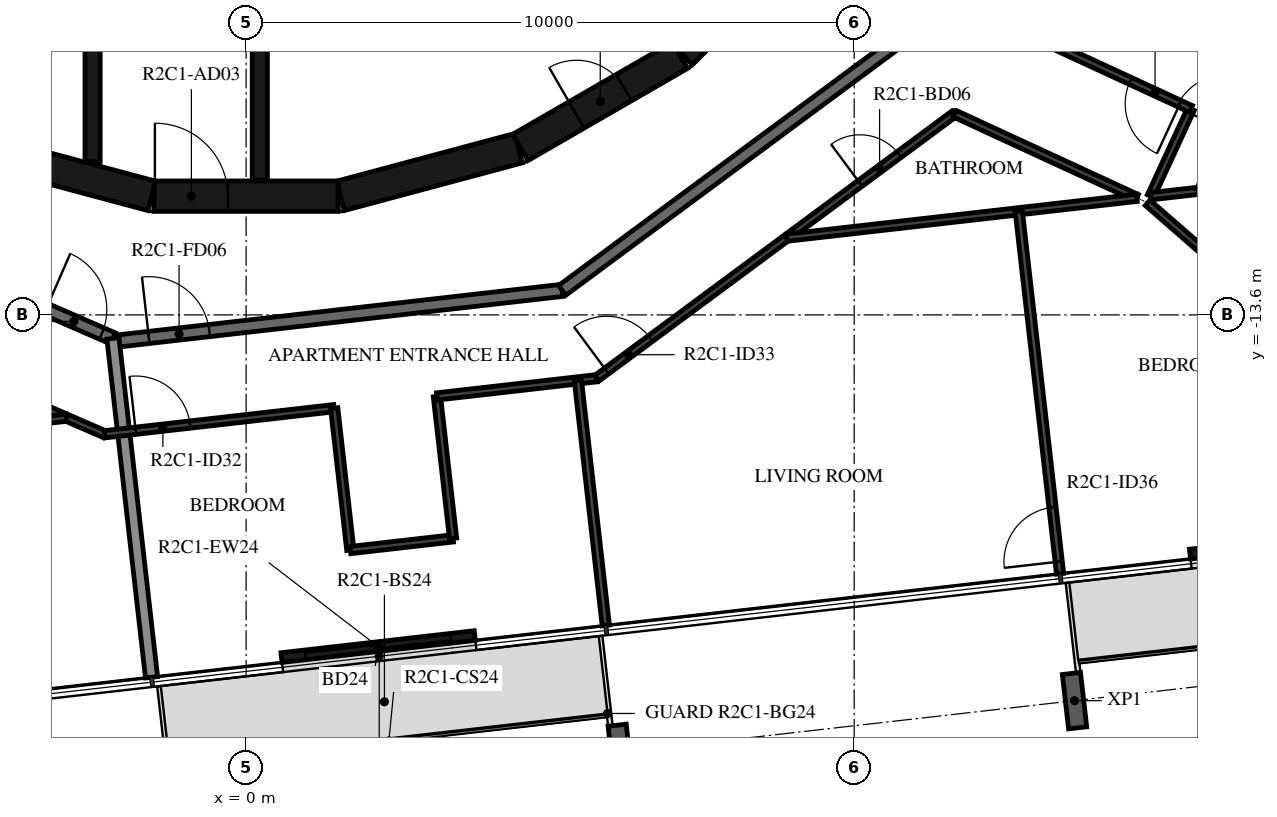
"""IFC4 building model, lengths in metres.
Left out: names, types, materials, properties, quantities, classifications, styles, units other than length and angle.
Written with IfcOpenShell. Run it as: python <this file> out.ifc"""

import sys

from ifc_helpers import new_model, si_unit, direction, frame, frame_2d, origin, origin_2d, place, context, subcontext, project, spatial, rectangle, i_section, extrude, element, fill, save


model = new_model("IFC4")
c1 = context("Model", 3, precision=1e-05, world=origin(), true_north=direction((0.0, 1.0)))
c2 = subcontext(c1, "Body", "Model", "MODEL_VIEW")
j1 = project(units=[si_unit("LENGTHUNIT", "METRE"), si_unit("PLANEANGLEUNIT", "RADIAN")], contexts=[c1])
p1 = place(None, origin())
s1 = spatial("IfcSite", under=j1, at=p1, CompositionType="ELEMENT")
p2 = place(p1, origin())
s2 = spatial("IfcBuilding", under=s1, at=p2, CompositionType="ELEMENT")
p3 = place(p2, frame((0.0, 0.0, 101.2)))
s3 = spatial("IfcBuildingStorey", under=s2, at=p3, CompositionType="ELEMENT", Elevation=101.2)
for number, where, z_axis, x_axis in (
    (1, (6.153, -20.795, -0.38), (0.0, 0.0, 1.0), (-0.994, -0.113, 0.0)),
    (2, (13.624, -19.944, -0.38), (0.0, 0.0, 1.0), (-0.994, -0.113, 0.0)),
):
    element("IfcColumn", number, at=place(p3, frame(where, z_axis=z_axis, x_axis=x_axis)), inside=s3, PredefinedType="COLUMN", context=c2, shape_type="SweptSolid", body=[
        extrude(i_section(OverallWidth=0.3, OverallDepth=0.9, WebThickness=0.019, FlangeThickness=0.035, FilletRadius=0.03, at=origin_2d()), origin(), (0.0, 0.0, 1.0), 3.5),
    ])
p4 = place(p3, frame((0.581, -19.235, 0.0), z_axis=(0.0, 0.0, 1.0), x_axis=(0.993569997097, 0.113219525124, 0.0)))
e3 = element("IfcWall", 3, at=p4, inside=s3, PredefinedType="STANDARD", context=c2, shape_type="SweptSolid", body=[
    extrude(rectangle(XDim=3.2, YDim=0.16, at=frame_2d((1.6, 0.0))), origin(), (0.0, 0.0, 1.0), 3.12),
])
p5 = place(p4, frame((0.4, 0.0, 0.0)))
e4 = element("IfcOpeningElement", 4, at=p5, cuts=e3, PredefinedType="OPENING", context=c2, shape_type="SweptSolid", body=[
    extrude(rectangle(XDim=2.4, YDim=2.4, at=frame_2d((1.2, 1.2))), frame((0.0, 0.09, 0.0), z_axis=(0.0, -1.0, 0.0), x_axis=(1.0, 0.0, 0.0)), (0.0, 0.0, 1.0), 0.18),
])
p6 = place(p3, frame((15.522, -17.533, 0.0), z_axis=(0.0, 0.0, 1.0), x_axis=(0.993578576686, 0.113144208648, 0.0)))
e5 = element("IfcWall", 5, at=p6, inside=s3, PredefinedType="STANDARD", context=c2, shape_type="SweptSolid", body=[
    extrude(rectangle(XDim=3.2, YDim=0.16, at=frame_2d((1.6, 0.0))), origin(), (0.0, 0.0, 1.0), 3.12),
])
p7 = place(p6, frame((0.4, 0.0, 0.0)))
e6 = element("IfcOpeningElement", 6, at=p7, cuts=e5, PredefinedType="OPENING", context=c2, shape_type="SweptSolid", body=[
    extrude(rectangle(XDim=2.4, YDim=2.4, at=frame_2d((1.2, 1.2))), frame((0.0, 0.09, 0.0), z_axis=(0.0, -1.0, 0.0), x_axis=(1.0, 0.0, 0.0)), (0.0, 0.0, 1.0), 0.18),
])
p8 = place(p3, frame((1.55, -11.643, 0.0), z_axis=(0.0, 0.0, 1.0), x_axis=(0.965948410781, 0.258734743916, 0.0)))
e7 = element("IfcWall", 7, at=p8, inside=s3, PredefinedType="SHEAR", context=c2, shape_type="SweptSolid", body=[
    extrude(rectangle(XDim=3.033, YDim=0.5, at=frame_2d((1.516, 0.0))), origin(), (0.0, 0.0, 1.0), 3.12),
])
p9 = place(p3, frame((4.51, -10.845, 0.0), z_axis=(0.0, 0.0, 1.0), x_axis=(0.865975092491, 0.500087131594, 0.0)))
e8 = element("IfcWall", 8, at=p9, inside=s3, PredefinedType="SHEAR", context=c2, shape_type="SweptSolid", body=[
    extrude(rectangle(XDim=3.033, YDim=0.5, at=frame_2d((1.516, 0.0))), origin(), (0.0, 0.0, 1.0), 3.12),
])
p10 = place(p9, frame((1.066, 0.0, 0.0)))
e9 = element("IfcOpeningElement", 9, at=p10, cuts=e8, PredefinedType="OPENING", context=c2, shape_type="SweptSolid", body=[
    extrude(rectangle(XDim=0.9, YDim=2.1, at=frame_2d((0.45, 1.05))), frame((0.0, 0.26, 0.0), z_axis=(0.0, -1.0, 0.0), x_axis=(1.0, 0.0, 0.0)), (0.0, 0.0, 1.0), 0.52),
])
p11 = place(p3, frame((7.164, -9.308, 0.0), z_axis=(0.0, 0.0, 1.0), x_axis=(0.707106781187, 0.707106781187, 0.0)))
e10 = element("IfcWall", 10, at=p11, inside=s3, PredefinedType="SHEAR", context=c2, shape_type="SweptSolid", body=[
    extrude(rectangle(XDim=3.032, YDim=0.5, at=frame_2d((1.516, 0.0))), origin(), (0.0, 0.0, 1.0), 3.12),
])
p12 = place(p3, frame((-4.479, -10.858, 0.0), z_axis=(0.0, 0.0, 1.0), x_axis=(0.965948410781, -0.258734743916, 0.0)))
e11 = element("IfcWall", 11, at=p12, inside=s3, PredefinedType="SHEAR", context=c2, shape_type="SweptSolid", body=[
    extrude(rectangle(XDim=3.033, YDim=0.5, at=frame_2d((1.516, 0.0))), origin(), (0.0, 0.0, 1.0), 3.12),
])
p13 = place(p3, frame((-1.516, -11.647, 0.0), z_axis=(0.0, 0.0, 1.0), x_axis=(1.0, 0.0, 0.0)))
e12 = element("IfcWall", 12, at=p13, inside=s3, PredefinedType="SHEAR", context=c2, shape_type="SweptSolid", body=[
    extrude(rectangle(XDim=3.033, YDim=0.5, at=frame_2d((1.516, 0.0))), origin(), (0.0, 0.0, 1.0), 3.12),
])
p14 = place(p13, frame((0.016, 0.0, 0.0)))
e13 = element("IfcOpeningElement", 13, at=p14, cuts=e12, PredefinedType="OPENING", context=c2, shape_type="SweptSolid", body=[
    extrude(rectangle(XDim=1.2, YDim=2.1, at=frame_2d((0.6, 1.05))), frame((0.0, 0.26, 0.0), z_axis=(0.0, -1.0, 0.0), x_axis=(1.0, 0.0, 0.0)), (0.0, 0.0, 1.0), 0.52),
])
p15 = place(p3, frame((-2.525, -8.97, 0.0), z_axis=(0.0, 0.0, 1.0), x_axis=(0.0, -1.0, 0.0)))
e14 = element("IfcWall", 14, at=p15, inside=s3, PredefinedType="SHEAR", context=c2, shape_type="SweptSolid", body=[
    extrude(rectangle(XDim=2.11, YDim=0.25, at=frame_2d((1.055, 0.0))), origin(), (0.0, 0.0, 1.0), 3.12),
])
p16 = place(p3, frame((0.225, -8.97, 0.0), z_axis=(0.0, 0.0, 1.0), x_axis=(0.0, -1.0, 0.0)))
e15 = element("IfcWall", 15, at=p16, inside=s3, PredefinedType="SHEAR", context=c2, shape_type="SweptSolid", body=[
    extrude(rectangle(XDim=2.41, YDim=0.25, at=frame_2d((1.205, 0.0))), origin(), (0.0, 0.0, 1.0), 3.12),
])
p17 = place(p3, frame((-8.829, -11.1, 0.0), z_axis=(0.0, 0.0, 1.0), x_axis=(0.917063622491, -0.398740908742, 0.0)))
e16 = element("IfcWall", 16, at=p17, inside=s3, PredefinedType="STANDARD", context=c2, shape_type="SweptSolid", body=[
    extrude(rectangle(XDim=7.24, YDim=0.2, at=frame_2d((3.62, 0.0))), origin(), (0.0, 0.0, 1.0), 3.12),
])
p18 = place(p17, frame((6.04, 0.0, 0.0)))
e17 = element("IfcOpeningElement", 17, at=p18, cuts=e16, PredefinedType="OPENING", context=c2, shape_type="SweptSolid", body=[
    extrude(rectangle(XDim=1.0, YDim=2.1, at=frame_2d((0.5, 1.05))), frame((0.0, 0.11, 0.0), z_axis=(0.0, -1.0, 0.0), x_axis=(1.0, 0.0, 0.0)), (0.0, 0.0, 1.0), 0.22),
])
p19 = place(p3, frame((-2.096, -14.028, 0.0), z_axis=(0.0, 0.0, 1.0), x_axis=(0.993569170114, 0.113226782163, 0.0)))
e18 = element("IfcWall", 18, at=p19, inside=s3, PredefinedType="STANDARD", context=c2, shape_type="SweptSolid", body=[
    extrude(rectangle(XDim=7.342, YDim=0.2, at=frame_2d((3.671, 0.0))), origin(), (0.0, 0.0, 1.0), 3.12),
])
p20 = place(p19, frame((0.5, 0.0, 0.0)))
e19 = element("IfcOpeningElement", 19, at=p20, cuts=e18, PredefinedType="OPENING", context=c2, shape_type="SweptSolid", body=[
    extrude(rectangle(XDim=1.0, YDim=2.1, at=frame_2d((0.5, 1.05))), frame((0.0, 0.11, 0.0), z_axis=(0.0, -1.0, 0.0), x_axis=(1.0, 0.0, 0.0)), (0.0, 0.0, 1.0), 0.22),
])
p21 = place(p3, frame((5.198, -13.196, 0.0), z_axis=(0.0, 0.0, 1.0), x_axis=(0.803869883159, 0.594805187394, 0.0)))
e20 = element("IfcWall", 20, at=p21, inside=s3, PredefinedType="STANDARD", context=c2, shape_type="SweptSolid", body=[
    extrude(rectangle(XDim=7.342, YDim=0.2, at=frame_2d((3.671, 0.0))), origin(), (0.0, 0.0, 1.0), 3.12),
])
p22 = place(p3, frame((-1.555, -19.559, 0.0), z_axis=(0.0, 0.0, 1.0), x_axis=(-0.113221250863, 0.993569800443, 0.0)))
e21 = element("IfcWall", 21, at=p22, inside=s3, PredefinedType="STANDARD", context=c2, shape_type="SweptSolid", body=[
    extrude(rectangle(XDim=5.609, YDim=0.2, at=frame_2d((2.804, 0.0))), origin(), (0.0, 0.0, 1.0), 2.73),
])
p23 = place(p3, frame((-9.562, -12.417, 0.0), z_axis=(0.0, 0.0, 1.0), x_axis=(0.917063169851, -0.398741949767, 0.0)))
e22 = element("IfcWall", 22, at=p23, inside=s3, PredefinedType="PARTITIONING", context=c2, shape_type="SweptSolid", body=[
    extrude(rectangle(XDim=7.891, YDim=0.12, at=frame_2d((3.946, 0.0))), origin(), (0.0, 0.0, 1.0), 3.12),
])
p24 = place(p23, frame((0.715, 0.0, 0.0)))
e23 = element("IfcOpeningElement", 23, at=p24, cuts=e22, PredefinedType="OPENING", context=c2, shape_type="SweptSolid", body=[
    extrude(rectangle(XDim=0.8, YDim=2.1, at=frame_2d((0.4, 1.05))), frame((0.0, 0.07, 0.0), z_axis=(0.0, -1.0, 0.0), x_axis=(1.0, 0.0, 0.0)), (0.0, 0.0, 1.0), 0.14),
])
p25 = place(p3, frame((-2.326, -15.563, 0.0), z_axis=(0.0, 0.0, 1.0), x_axis=(0.993575068384, 0.113175012641, 0.0)))
e24 = element("IfcWall", 24, at=p25, inside=s3, PredefinedType="PARTITIONING", context=c2, shape_type="SweptSolid", body=[
    extrude(rectangle(XDim=3.799, YDim=0.12, at=frame_2d((1.899, 0.0))), origin(), (0.0, 0.0, 1.0), 3.12),
])
p26 = place(p25, frame((0.513, 0.0, 0.0)))
e25 = element("IfcOpeningElement", 25, at=p26, cuts=e24, PredefinedType="OPENING", context=c2, shape_type="SweptSolid", body=[
    extrude(rectangle(XDim=0.9, YDim=2.1, at=frame_2d((0.45, 1.05))), frame((0.0, 0.07, 0.0), z_axis=(0.0, -1.0, 0.0), x_axis=(1.0, 0.0, 0.0)), (0.0, 0.0, 1.0), 0.14),
])
p27 = place(p3, frame((-17.437, -16.94, 0.0), z_axis=(0.0, 0.0, 1.0), x_axis=(0.993573314119, 0.113190412448, 0.0)))
e26 = element("IfcWall", 26, at=p27, inside=s3, PredefinedType="PARTITIONING", context=c2, shape_type="SweptSolid", body=[
    extrude(rectangle(XDim=14.576, YDim=0.12, at=frame_2d((7.288, 0.0))), origin(), (0.0, 0.0, 1.0), 3.12),
])
p28 = place(p27, frame((3.201, 0.0, 0.0)))
e27 = element("IfcOpeningElement", 27, at=p28, cuts=e26, PredefinedType="OPENING", context=c2, shape_type="SweptSolid", body=[
    extrude(rectangle(XDim=0.9, YDim=2.1, at=frame_2d((0.45, 1.05))), frame((0.0, 0.07, 0.0), z_axis=(0.0, -1.0, 0.0), x_axis=(1.0, 0.0, 0.0)), (0.0, 0.0, 1.0), 0.14),
])
p29 = place(p27, frame((5.985, 0.0, 0.0)))
e28 = element("IfcOpeningElement", 28, at=p29, cuts=e26, PredefinedType="OPENING", context=c2, shape_type="SweptSolid", body=[
    extrude(rectangle(XDim=0.9, YDim=2.1, at=frame_2d((0.45, 1.05))), frame((0.0, 0.07, 0.0), z_axis=(0.0, -1.0, 0.0), x_axis=(1.0, 0.0, 0.0)), (0.0, 0.0, 1.0), 0.14),
])
p30 = place(p3, frame((1.448, -15.133, 0.0), z_axis=(0.0, 0.0, 1.0), x_axis=(0.113180189053, -0.993574478741, 0.0)))
e29 = element("IfcWall", 29, at=p30, inside=s3, PredefinedType="PARTITIONING", context=c2, shape_type="SweptSolid", body=[
    extrude(rectangle(XDim=2.349, YDim=0.12, at=frame_2d((1.175, 0.0))), origin(), (0.0, 0.0, 1.0), 3.12),
])
p31 = place(p3, frame((1.714, -17.467, 0.0), z_axis=(0.0, 0.0, 1.0), x_axis=(0.993577030812, 0.113157782957, 0.0)))
e30 = element("IfcWall", 30, at=p31, inside=s3, PredefinedType="PARTITIONING", context=c2, shape_type="SweptSolid", body=[
    extrude(rectangle(XDim=1.7, YDim=0.12, at=frame_2d((0.85, 0.0))), origin(), (0.0, 0.0, 1.0), 3.12),
])
p32 = place(p3, frame((3.404, -17.275, 0.0), z_axis=(0.0, 0.0, 1.0), x_axis=(-0.113180189053, 0.993574478741, 0.0)))
e31 = element("IfcWall", 31, at=p32, inside=s3, PredefinedType="PARTITIONING", context=c2, shape_type="SweptSolid", body=[
    extrude(rectangle(XDim=2.349, YDim=0.12, at=frame_2d((1.175, 0.0))), origin(), (0.0, 0.0, 1.0), 3.12),
])
p33 = place(p3, frame((3.138, -14.941, 0.0), z_axis=(0.0, 0.0, 1.0), x_axis=(0.99356355736, 0.113276023437, 0.0)))
e32 = element("IfcWall", 32, at=p33, inside=s3, PredefinedType="PARTITIONING", context=c2, shape_type="SweptSolid", body=[
    extrude(rectangle(XDim=2.647, YDim=0.12, at=frame_2d((1.323, 0.0))), origin(), (0.0, 0.0, 1.0), 3.12),
])
p34 = place(p3, frame((5.767, -14.641, 0.0), z_axis=(0.0, 0.0, 1.0), x_axis=(0.803867427863, 0.594808505673, 0.0)))
e33 = element("IfcWall", 33, at=p34, inside=s3, PredefinedType="PARTITIONING", context=c2, shape_type="SweptSolid", body=[
    extrude(rectangle(XDim=7.316, YDim=0.12, at=frame_2d((3.658, 0.0))), origin(), (0.0, 0.0, 1.0), 3.12),
])
p35 = place(p34, frame((0.2, 0.0, 0.0)))
e34 = element("IfcOpeningElement", 34, at=p35, cuts=e33, PredefinedType="OPENING", context=c2, shape_type="SweptSolid", body=[
    extrude(rectangle(XDim=0.9, YDim=2.1, at=frame_2d((0.45, 1.05))), frame((0.0, 0.07, 0.0), z_axis=(0.0, -1.0, 0.0), x_axis=(1.0, 0.0, 0.0)), (0.0, 0.0, 1.0), 0.14),
])
p36 = place(p34, frame((5.385, 0.0, 0.0)))
e35 = element("IfcOpeningElement", 35, at=p36, cuts=e33, PredefinedType="OPENING", context=c2, shape_type="SweptSolid", body=[
    extrude(rectangle(XDim=0.8, YDim=2.1, at=frame_2d((0.4, 1.05))), frame((0.0, 0.07, 0.0), z_axis=(0.0, -1.0, 0.0), x_axis=(1.0, 0.0, 0.0)), (0.0, 0.0, 1.0), 0.14),
])
p37 = place(p3, frame((11.649, -10.289, 0.0), z_axis=(0.0, 0.0, 1.0), x_axis=(0.9079269461, -0.419128453514, 0.0)))
e36 = element("IfcWall", 36, at=p37, inside=s3, PredefinedType="PARTITIONING", context=c2, shape_type="SweptSolid", body=[
    extrude(rectangle(XDim=3.304, YDim=0.12, at=frame_2d((1.652, 0.0))), origin(), (0.0, 0.0, 1.0), 3.12),
])
p38 = place(p3, frame((14.875, -11.648, 0.0), z_axis=(0.0, 0.0, 1.0), x_axis=(0.419087543301, 0.90794583046, 0.0)))
e37 = element("IfcWall", 37, at=p38, inside=s3, PredefinedType="PARTITIONING", context=c2, shape_type="SweptSolid", body=[
    extrude(rectangle(XDim=1.582, YDim=0.12, at=frame_2d((0.791, 0.0))), origin(), (0.0, 0.0, 1.0), 3.12),
])
p39 = place(p3, frame((15.538, -10.212, 0.0), z_axis=(0.0, 0.0, 1.0), x_axis=(-0.907941075756, 0.419097844131, 0.0)))
e38 = element("IfcWall", 38, at=p39, inside=s3, PredefinedType="PARTITIONING", context=c2, shape_type="SweptSolid", body=[
    extrude(rectangle(XDim=3.122, YDim=0.12, at=frame_2d((1.561, 0.0))), origin(), (0.0, 0.0, 1.0), 3.12),
])
p40 = place(p39, frame((0.2, 0.0, 0.0)))
e39 = element("IfcOpeningElement", 39, at=p40, cuts=e38, PredefinedType="OPENING", context=c2, shape_type="SweptSolid", body=[
    extrude(rectangle(XDim=0.9, YDim=2.1, at=frame_2d((0.45, 1.05))), frame((0.0, 0.07, 0.0), z_axis=(0.0, -1.0, 0.0), x_axis=(1.0, 0.0, 0.0)), (0.0, 0.0, 1.0), 0.14),
])
p41 = place(p3, frame((5.915, -18.708, 0.0), z_axis=(0.0, 0.0, 1.0), x_axis=(-0.113244511591, 0.993567149515, 0.0)))
e40 = element("IfcWall", 40, at=p41, inside=s3, PredefinedType="PARTITIONING", context=c2, shape_type="SweptSolid", body=[
    extrude(rectangle(XDim=4.057, YDim=0.12, at=frame_2d((2.029, 0.0))), origin(), (0.0, 0.0, 1.0), 2.73),
])
p42 = place(p3, frame((14.649, -11.674, 0.0), z_axis=(0.0, 0.0, 1.0), x_axis=(-0.993573746873, -0.113186613721, 0.0)))
e41 = element("IfcWall", 41, at=p42, inside=s3, PredefinedType="PARTITIONING", context=c2, shape_type="SweptSolid", body=[
    extrude(rectangle(XDim=5.796, YDim=0.12, at=frame_2d((2.898, 0.0))), origin(), (0.0, 0.0, 1.0), 3.12),
])
p43 = place(p3, frame((13.386, -17.857, 0.0), z_axis=(0.0, 0.0, 1.0), x_axis=(-0.113200012983, 0.993572220355, 0.0)))
e42 = element("IfcWall", 42, at=p43, inside=s3, PredefinedType="PARTITIONING", context=c2, shape_type="SweptSolid", body=[
    extrude(rectangle(XDim=6.0, YDim=0.12, at=frame_2d((3.0, 0.0))), origin(), (0.0, 0.0, 1.0), 2.73),
])
p44 = place(p43, frame((0.2, 0.0, 0.0)))
e43 = element("IfcOpeningElement", 43, at=p44, cuts=e42, PredefinedType="OPENING", context=c2, shape_type="SweptSolid", body=[
    extrude(rectangle(XDim=0.9, YDim=2.1, at=frame_2d((0.45, 1.05))), frame((0.0, 0.07, 0.0), z_axis=(0.0, -1.0, 0.0), x_axis=(1.0, 0.0, 0.0)), (0.0, 0.0, 1.0), 0.14),
])
p45 = place(p3, frame((20.856, -17.006, 0.0), z_axis=(0.0, 0.0, 1.0), x_axis=(-0.75423134567, 0.656608770281, 0.0)))
e44 = element("IfcWall", 44, at=p45, inside=s3, PredefinedType="PARTITIONING", context=c2, shape_type="SweptSolid", body=[
    extrude(rectangle(XDim=7.995, YDim=0.12, at=frame_2d((3.998, 0.0))), origin(), (0.0, 0.0, 1.0), 3.12),
])
p46 = place(p3, frame((20.527, -11.004, 0.0), z_axis=(0.0, 0.0, 1.0), x_axis=(-0.993568869194, -0.113229422712, 0.0)))
e45 = element("IfcWall", 45, at=p46, inside=s3, PredefinedType="PARTITIONING", context=c2, shape_type="SweptSolid", body=[
    extrude(rectangle(XDim=5.688, YDim=0.12, at=frame_2d((2.844, 0.0))), origin(), (0.0, 0.0, 1.0), 3.12),
])
p47 = place(p46, frame((1.6, 0.0, 0.0)))
e46 = element("IfcOpeningElement", 46, at=p47, cuts=e45, PredefinedType="OPENING", context=c2, shape_type="SweptSolid", body=[
    extrude(rectangle(XDim=0.9, YDim=2.1, at=frame_2d((0.45, 1.05))), frame((0.0, 0.07, 0.0), z_axis=(0.0, -1.0, 0.0), x_axis=(1.0, 0.0, 0.0)), (0.0, 0.0, 1.0), 0.14),
])
p48 = place(p3, frame((15.686, -11.556, 0.0), z_axis=(0.0, 0.0, 1.0), x_axis=(0.398740569839, 0.917063769846, 0.0)))
e47 = element("IfcWall", 47, at=p48, inside=s3, PredefinedType="PARTITIONING", context=c2, shape_type="SweptSolid", body=[
    extrude(rectangle(XDim=4.322, YDim=0.12, at=frame_2d((2.161, 0.0))), origin(), (0.0, 0.0, 1.0), 3.12),
])
p49 = place(p48, frame((1.1, 0.0, 0.0)))
e48 = element("IfcOpeningElement", 48, at=p49, cuts=e47, PredefinedType="OPENING", context=c2, shape_type="SweptSolid", body=[
    extrude(rectangle(XDim=0.9, YDim=2.1, at=frame_2d((0.45, 1.05))), frame((0.0, 0.07, 0.0), z_axis=(0.0, -1.0, 0.0), x_axis=(1.0, 0.0, 0.0)), (0.0, 0.0, 1.0), 0.14),
])
p50 = place(p5, origin())
e49 = element("IfcDoor", 49, at=p50, inside=s3, OperationType="DOUBLE_DOOR_SLIDING", PredefinedType="DOOR", context=c2, shape_type="SweptSolid", body=[
    extrude(rectangle(XDim=2.4, YDim=2.4, at=frame_2d((1.2, 1.2))), frame((0.0, 0.025, 0.0), z_axis=(0.0, -1.0, 0.0), x_axis=(1.0, 0.0, 0.0)), (0.0, 0.0, 1.0), 0.05),
])
fill(e4, e49)
p51 = place(p14, origin())
e50 = element("IfcDoor", 50, at=p51, inside=s3, OperationType="SINGLE_SWING_RIGHT", PredefinedType="DOOR", context=c2, shape_type="SweptSolid", body=[
    extrude(rectangle(XDim=1.2, YDim=2.1, at=frame_2d((0.6, 1.05))), frame((0.0, 0.025, 0.0), z_axis=(0.0, -1.0, 0.0), x_axis=(1.0, 0.0, 0.0)), (0.0, 0.0, 1.0), 0.05),
])
fill(e13, e50)
p52 = place(p10, origin())
e51 = element("IfcDoor", 51, at=p52, inside=s3, OperationType="SINGLE_SWING_LEFT", PredefinedType="DOOR", context=c2, shape_type="SweptSolid", body=[
    extrude(rectangle(XDim=0.9, YDim=2.1, at=frame_2d((0.45, 1.05))), frame((0.0, 0.025, 0.0), z_axis=(0.0, -1.0, 0.0), x_axis=(1.0, 0.0, 0.0)), (0.0, 0.0, 1.0), 0.05),
])
fill(e9, e51)
p53 = place(p18, origin())
e52 = element("IfcDoor", 52, at=p53, inside=s3, OperationType="SINGLE_SWING_LEFT", PredefinedType="DOOR", context=c2, shape_type="SweptSolid", body=[
    extrude(rectangle(XDim=1.0, YDim=2.1, at=frame_2d((0.5, 1.05))), frame((0.0, 0.025, 0.0), z_axis=(0.0, -1.0, 0.0), x_axis=(1.0, 0.0, 0.0)), (0.0, 0.0, 1.0), 0.05),
])
fill(e17, e52)
p54 = place(p20, origin())
e53 = element("IfcDoor", 53, at=p54, inside=s3, OperationType="SINGLE_SWING_LEFT", PredefinedType="DOOR", context=c2, shape_type="SweptSolid", body=[
    extrude(rectangle(XDim=1.0, YDim=2.1, at=frame_2d((0.5, 1.05))), frame((0.0, 0.025, 0.0), z_axis=(0.0, -1.0, 0.0), x_axis=(1.0, 0.0, 0.0)), (0.0, 0.0, 1.0), 0.05),
])
fill(e19, e53)
p55 = place(p26, origin())
e54 = element("IfcDoor", 54, at=p55, inside=s3, OperationType="SINGLE_SWING_LEFT", PredefinedType="DOOR", context=c2, shape_type="SweptSolid", body=[
    extrude(rectangle(XDim=0.9, YDim=2.1, at=frame_2d((0.45, 1.05))), frame((0.0, 0.025, 0.0), z_axis=(0.0, -1.0, 0.0), x_axis=(1.0, 0.0, 0.0)), (0.0, 0.0, 1.0), 0.05),
])
fill(e25, e54)
p56 = place(p35, origin())
e55 = element("IfcDoor", 55, at=p56, inside=s3, OperationType="SINGLE_SWING_RIGHT", PredefinedType="DOOR", context=c2, shape_type="SweptSolid", body=[
    extrude(rectangle(XDim=0.9, YDim=2.1, at=frame_2d((0.45, 1.05))), frame((0.0, 0.025, 0.0), z_axis=(0.0, -1.0, 0.0), x_axis=(1.0, 0.0, 0.0)), (0.0, 0.0, 1.0), 0.05),
])
fill(e34, e55)
p57 = place(p36, origin())
e56 = element("IfcDoor", 56, at=p57, inside=s3, OperationType="SINGLE_SWING_RIGHT", PredefinedType="DOOR", context=c2, shape_type="SweptSolid", body=[
    extrude(rectangle(XDim=0.8, YDim=2.1, at=frame_2d((0.4, 1.05))), frame((0.0, 0.025, 0.0), z_axis=(0.0, -1.0, 0.0), x_axis=(1.0, 0.0, 0.0)), (0.0, 0.0, 1.0), 0.05),
])
fill(e35, e56)
p58 = place(p40, origin())
e57 = element("IfcDoor", 57, at=p58, inside=s3, OperationType="SINGLE_SWING_LEFT", PredefinedType="DOOR", context=c2, shape_type="SweptSolid", body=[
    extrude(rectangle(XDim=0.9, YDim=2.1, at=frame_2d((0.45, 1.05))), frame((0.0, 0.025, 0.0), z_axis=(0.0, -1.0, 0.0), x_axis=(1.0, 0.0, 0.0)), (0.0, 0.0, 1.0), 0.05),
])
fill(e39, e57)
p59 = place(p44, origin())
e58 = element("IfcDoor", 58, at=p59, inside=s3, OperationType="SINGLE_SWING_RIGHT", PredefinedType="DOOR", context=c2, shape_type="SweptSolid", body=[
    extrude(rectangle(XDim=0.9, YDim=2.1, at=frame_2d((0.45, 1.05))), frame((0.0, 0.025, 0.0), z_axis=(0.0, -1.0, 0.0), x_axis=(1.0, 0.0, 0.0)), (0.0, 0.0, 1.0), 0.05),
])
fill(e43, e58)
save(model, sys.argv[1])
